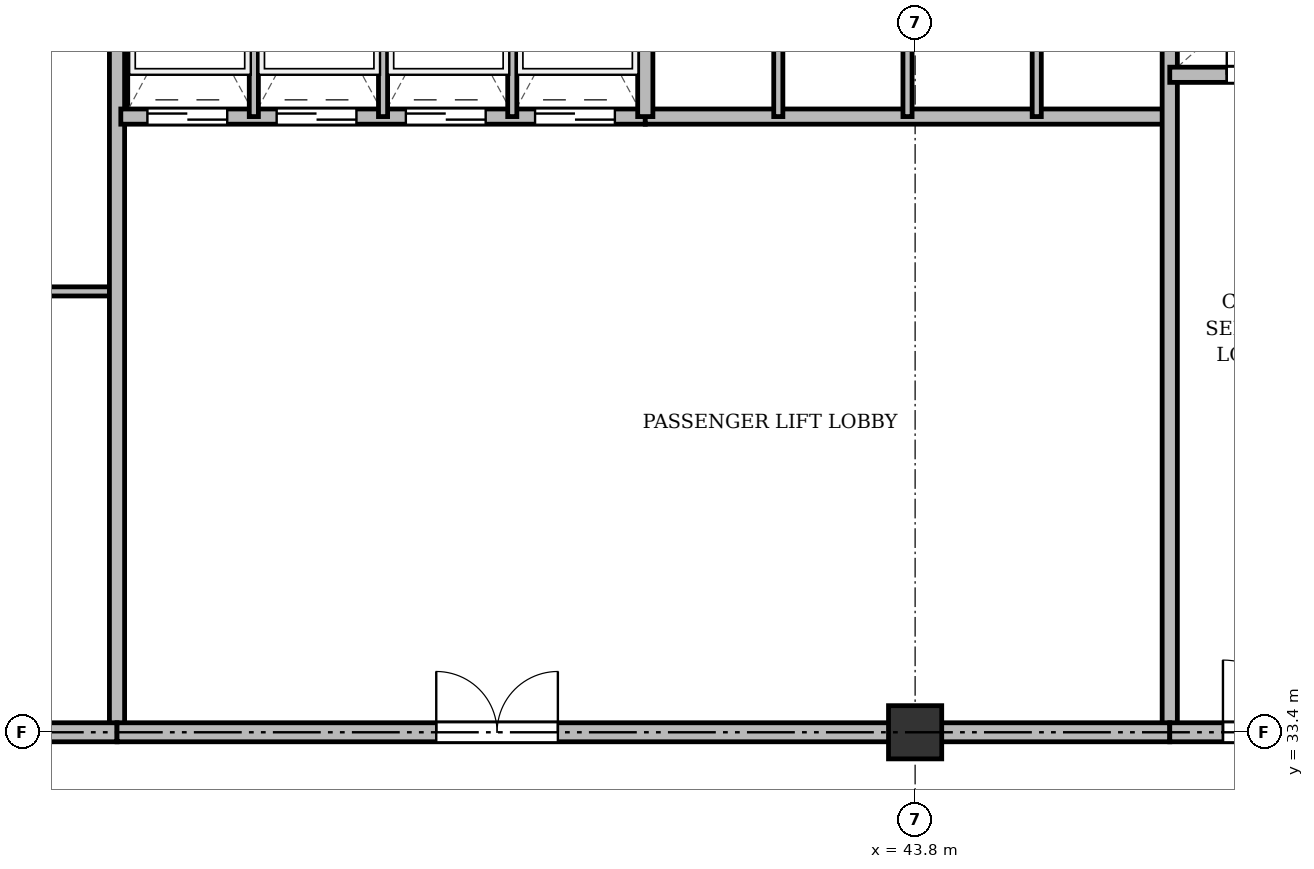
"""IFC4 building model, lengths in metres.
Left out: names, types, materials, properties, quantities, classifications, styles, units other than length and angle.
Written with IfcOpenShell. Run it as: python <this file> out.ifc"""

import sys

from ifc_helpers import new_model, si_unit, direction, frame, frame_2d, origin, origin_2d, place, context, subcontext, project, spatial, rectangle, extrude, source, transform, mapped, element, fill, save


model = new_model("IFC4")
c1 = context("Model", 3, precision=1e-05, world=origin(), true_north=direction((0.0, 1.0)))
c2 = subcontext(c1, "Body", "Model", "MODEL_VIEW")
j1 = project(units=[si_unit("LENGTHUNIT", "METRE"), si_unit("PLANEANGLEUNIT", "RADIAN")], contexts=[c1])
p1 = place(None, origin())
s1 = spatial("IfcSite", under=j1, at=p1, CompositionType="ELEMENT")
p2 = place(p1, origin())
s2 = spatial("IfcBuilding", under=s1, at=p2, CompositionType="ELEMENT")
p3 = place(p2, frame((0.0, 0.0, 194.1)))
s3 = spatial("IfcBuildingStorey", under=s2, at=p3, CompositionType="ELEMENT", Elevation=194.1)
m1 = source(origin(), c2, "Body", "SweptSolid", [
    extrude(rectangle(XDim=0.7, YDim=0.7, at=origin_2d()), origin(), (0.0, 0.0, 1.0), 3.6),
])
p4 = place(p3, frame((43.8, 33.4, 0.0), z_axis=(0.0, 0.0, 1.0), x_axis=(1.0, 0.0, 0.0)))
e1 = element("IfcColumn", 1, at=p4, inside=s3, PredefinedType="COLUMN", context=c2, shape_type="MappedRepresentation", body=[
    mapped(m1, transform((0.0, 0.0, 0.0), x_axis=(1.0, 0.0, 0.0), y_axis=(0.0, 1.0, 0.0), z_axis=(0.0, 0.0, 1.0), scale=1.0)),
])
p5 = place(p3, frame((26.3, 39.2, 0.0), z_axis=(0.0, 0.0, 1.0), x_axis=(1.0, 0.0, 0.0)))
e2 = element("IfcWall", 2, at=p5, inside=s3, PredefinedType="PARTITIONING", context=c2, shape_type="SweptSolid", body=[
    extrude(rectangle(XDim=7.0, YDim=0.12, at=frame_2d((3.5, 0.0))), origin(), (0.0, 0.0, 1.0), 2.86),
])
p6 = place(p5, frame((2.6, 0.0, 0.0)))
e3 = element("IfcOpeningElement", 3, at=p6, cuts=e2, PredefinedType="OPENING", context=c2, shape_type="SweptSolid", body=[
    extrude(rectangle(XDim=0.95, YDim=2.15, at=frame_2d((0.475, 1.075))), frame((0.0, 0.07, 0.0), z_axis=(0.0, -1.0, 0.0), x_axis=(1.0, 0.0, 0.0)), (0.0, 0.0, 1.0), 0.14),
])
p7 = place(p3, frame((33.3, 33.4, 0.0), z_axis=(0.0, 0.0, 1.0), x_axis=(0.0, 1.0, 0.0)))
e4 = element("IfcWall", 4, at=p7, inside=s3, PredefinedType="SOLIDWALL", context=c2, shape_type="SweptSolid", body=[
    extrude(rectangle(XDim=11.3, YDim=0.2, at=frame_2d((5.65, 0.0))), origin(), (0.0, 0.0, 1.0), 2.91),
])
p8 = place(p3, frame((33.35, 41.5, 0.0), z_axis=(0.0, 0.0, 1.0), x_axis=(1.0, 0.0, 0.0)))
e5 = element("IfcWall", 5, at=p8, inside=s3, PredefinedType="SOLIDWALL", context=c2, shape_type="SweptSolid", body=[
    extrude(rectangle(XDim=6.9, YDim=0.2, at=frame_2d((3.45, 0.0))), origin(), (0.0, 0.0, 1.0), 3.36),
])
p9 = place(p8, frame((0.35, 0.0, 0.0)))
e6 = element("IfcOpeningElement", 6, at=p9, cuts=e5, PredefinedType="OPENING", context=c2, shape_type="SweptSolid", body=[
    extrude(rectangle(XDim=1.05, YDim=2.15, at=frame_2d((0.525, 1.075))), frame((0.0, 0.11, 0.0), z_axis=(0.0, -1.0, 0.0), x_axis=(1.0, 0.0, 0.0)), (0.0, 0.0, 1.0), 0.22),
])
p10 = place(p8, frame((2.05, 0.0, 0.0)))
e7 = element("IfcOpeningElement", 7, at=p10, cuts=e5, PredefinedType="OPENING", context=c2, shape_type="SweptSolid", body=[
    extrude(rectangle(XDim=1.05, YDim=2.15, at=frame_2d((0.525, 1.075))), frame((0.0, 0.11, 0.0), z_axis=(0.0, -1.0, 0.0), x_axis=(1.0, 0.0, 0.0)), (0.0, 0.0, 1.0), 0.22),
])
p11 = place(p8, frame((3.75, 0.0, 0.0)))
e8 = element("IfcOpeningElement", 8, at=p11, cuts=e5, PredefinedType="OPENING", context=c2, shape_type="SweptSolid", body=[
    extrude(rectangle(XDim=1.05, YDim=2.15, at=frame_2d((0.525, 1.075))), frame((0.0, 0.11, 0.0), z_axis=(0.0, -1.0, 0.0), x_axis=(1.0, 0.0, 0.0)), (0.0, 0.0, 1.0), 0.22),
])
p12 = place(p8, frame((5.45, 0.0, 0.0)))
e9 = element("IfcOpeningElement", 9, at=p12, cuts=e5, PredefinedType="OPENING", context=c2, shape_type="SweptSolid", body=[
    extrude(rectangle(XDim=1.05, YDim=2.15, at=frame_2d((0.525, 1.075))), frame((0.0, 0.11, 0.0), z_axis=(0.0, -1.0, 0.0), x_axis=(1.0, 0.0, 0.0)), (0.0, 0.0, 1.0), 0.22),
])
for number, where, z_axis, x_axis in (
    (10, (35.1, 41.5, 0.0), (0.0, 0.0, 1.0), (0.0, 1.0, 0.0)),
    (11, (36.8, 41.5, 0.0), (0.0, 0.0, 1.0), (0.0, 1.0, 0.0)),
    (12, (38.5, 41.5, 0.0), (0.0, 0.0, 1.0), (0.0, 1.0, 0.0)),
):
    element("IfcWall", number, at=place(p3, frame(where, z_axis=z_axis, x_axis=x_axis)), inside=s3, PredefinedType="PARTITIONING", context=c2, shape_type="SweptSolid", body=[
        extrude(rectangle(XDim=3.2, YDim=0.12, at=frame_2d((1.6, 0.0))), origin(), (0.0, 0.0, 1.0), 3.36),
    ])
p13 = place(p3, frame((40.25, 41.5, 0.0), z_axis=(0.0, 0.0, 1.0), x_axis=(1.0, 0.0, 0.0)))
e13 = element("IfcWall", 13, at=p13, inside=s3, PredefinedType="SOLIDWALL", context=c2, shape_type="SweptSolid", body=[
    extrude(rectangle(XDim=6.9, YDim=0.2, at=frame_2d((3.45, 0.0))), origin(), (0.0, 0.0, 1.0), 2.86),
])
p14 = place(p3, frame((40.25, 41.5, 0.0), z_axis=(0.0, 0.0, 1.0), x_axis=(0.0, 1.0, 0.0)))
e14 = element("IfcWall", 14, at=p14, inside=s3, PredefinedType="SOLIDWALL", context=c2, shape_type="SweptSolid", body=[
    extrude(rectangle(XDim=3.2, YDim=0.2, at=frame_2d((1.6, 0.0))), origin(), (0.0, 0.0, 1.0), 3.36),
])
p15 = place(p3, frame((42.0, 41.5, 0.0), z_axis=(0.0, 0.0, 1.0), x_axis=(0.0, 1.0, 0.0)))
e15 = element("IfcWall", 15, at=p15, inside=s3, PredefinedType="PARTITIONING", context=c2, shape_type="SweptSolid", body=[
    extrude(rectangle(XDim=3.2, YDim=0.12, at=frame_2d((1.6, 0.0))), origin(), (0.0, 0.0, 1.0), 3.36),
])
p16 = place(p3, frame((43.7, 41.5, 0.0), z_axis=(0.0, 0.0, 1.0), x_axis=(0.0, 1.0, 0.0)))
e16 = element("IfcWall", 16, at=p16, inside=s3, PredefinedType="PARTITIONING", context=c2, shape_type="SweptSolid", body=[
    extrude(rectangle(XDim=3.2, YDim=0.12, at=frame_2d((1.6, 0.0))), origin(), (0.0, 0.0, 1.0), 2.86),
])
p17 = place(p3, frame((45.4, 41.5, 0.0), z_axis=(0.0, 0.0, 1.0), x_axis=(0.0, 1.0, 0.0)))
e17 = element("IfcWall", 17, at=p17, inside=s3, PredefinedType="PARTITIONING", context=c2, shape_type="SweptSolid", body=[
    extrude(rectangle(XDim=3.2, YDim=0.12, at=frame_2d((1.6, 0.0))), origin(), (0.0, 0.0, 1.0), 3.36),
])
p18 = place(p3, frame((47.15, 33.4, 0.0), z_axis=(0.0, 0.0, 1.0), x_axis=(0.0, 1.0, 0.0)))
e18 = element("IfcWall", 18, at=p18, inside=s3, PredefinedType="SOLIDWALL", context=c2, shape_type="SweptSolid", body=[
    extrude(rectangle(XDim=11.3, YDim=0.2, at=frame_2d((5.65, 0.0))), origin(), (0.0, 0.0, 1.0), 2.91),
])
p19 = place(p3, frame((26.3, 33.4, 0.0), z_axis=(0.0, 0.0, 1.0), x_axis=(1.0, 0.0, 0.0)))
e19 = element("IfcWall", 19, at=p19, inside=s3, PredefinedType="PARTITIONING", context=c2, shape_type="SweptSolid", body=[
    extrude(rectangle(XDim=7.0, YDim=0.25, at=frame_2d((3.5, 0.0))), origin(), (0.0, 0.0, 1.0), 2.91),
])
p20 = place(p19, frame((1.35, 0.0, 0.0)))
e20 = element("IfcOpeningElement", 20, at=p20, cuts=e19, PredefinedType="OPENING", context=c2, shape_type="SweptSolid", body=[
    extrude(rectangle(XDim=0.95, YDim=2.15, at=frame_2d((0.475, 1.075))), frame((0.0, 0.135, 0.0), z_axis=(0.0, -1.0, 0.0), x_axis=(1.0, 0.0, 0.0)), (0.0, 0.0, 1.0), 0.27),
])
p21 = place(p3, frame((33.3, 33.4, 0.0), z_axis=(0.0, 0.0, 1.0), x_axis=(1.0, 0.0, 0.0)))
e21 = element("IfcWall", 21, at=p21, inside=s3, PredefinedType="PARTITIONING", context=c2, shape_type="SweptSolid", body=[
    extrude(rectangle(XDim=13.85, YDim=0.25, at=frame_2d((6.925, 0.0))), origin(), (0.0, 0.0, 1.0), 2.91),
])
p22 = place(p21, frame((4.2, 0.0, 0.0)))
e22 = element("IfcOpeningElement", 22, at=p22, cuts=e21, PredefinedType="OPENING", context=c2, shape_type="SweptSolid", body=[
    extrude(rectangle(XDim=1.6, YDim=2.2, at=frame_2d((0.8, 1.1))), frame((0.0, 0.135, 0.0), z_axis=(0.0, -1.0, 0.0), x_axis=(1.0, 0.0, 0.0)), (0.0, 0.0, 1.0), 0.27),
])
p23 = place(p3, frame((47.15, 42.05, 0.0), z_axis=(0.0, 0.0, 1.0), x_axis=(1.0, 0.0, 0.0)))
e23 = element("IfcWall", 23, at=p23, inside=s3, PredefinedType="SOLIDWALL", context=c2, shape_type="SweptSolid", body=[
    extrude(rectangle(XDim=7.85, YDim=0.2, at=frame_2d((3.925, 0.0))), origin(), (0.0, 0.0, 1.0), 2.86),
])
p24 = place(p23, frame((0.75, 0.0, 0.0)))
e24 = element("IfcOpeningElement", 24, at=p24, cuts=e23, PredefinedType="OPENING", context=c2, shape_type="SweptSolid", body=[
    extrude(rectangle(XDim=0.9, YDim=2.1, at=frame_2d((0.45, 1.05))), frame((0.0, 0.11, 0.0), z_axis=(0.0, -1.0, 0.0), x_axis=(1.0, 0.0, 0.0)), (0.0, 0.0, 1.0), 0.22),
])
p25 = place(p23, frame((3.85, 0.0, 0.0)))
e25 = element("IfcOpeningElement", 25, at=p25, cuts=e23, PredefinedType="OPENING", context=c2, shape_type="SweptSolid", body=[
    extrude(rectangle(XDim=0.9, YDim=2.1, at=frame_2d((0.45, 1.05))), frame((0.0, 0.11, 0.0), z_axis=(0.0, -1.0, 0.0), x_axis=(1.0, 0.0, 0.0)), (0.0, 0.0, 1.0), 0.22),
])
p26 = place(p3, frame((47.15, 33.4, 0.0), z_axis=(0.0, 0.0, 1.0), x_axis=(1.0, 0.0, 0.0)))
e26 = element("IfcWall", 26, at=p26, inside=s3, PredefinedType="PARTITIONING", context=c2, shape_type="SweptSolid", body=[
    extrude(rectangle(XDim=11.15, YDim=0.25, at=frame_2d((5.575, 0.0))), origin(), (0.0, 0.0, 1.0), 2.91),
])
p27 = place(p26, frame((0.7, 0.0, 0.0)))
e27 = element("IfcOpeningElement", 27, at=p27, cuts=e26, PredefinedType="OPENING", context=c2, shape_type="SweptSolid", body=[
    extrude(rectangle(XDim=0.95, YDim=2.15, at=frame_2d((0.475, 1.075))), frame((0.0, 0.135, 0.0), z_axis=(0.0, -1.0, 0.0), x_axis=(1.0, 0.0, 0.0)), (0.0, 0.0, 1.0), 0.27),
])
p28 = place(p26, frame((6.0, 0.0, 0.0)))
e28 = element("IfcOpeningElement", 28, at=p28, cuts=e26, PredefinedType="OPENING", context=c2, shape_type="SweptSolid", body=[
    extrude(rectangle(XDim=1.2, YDim=2.15, at=frame_2d((0.6, 1.075))), frame((0.0, 0.135, 0.0), z_axis=(0.0, -1.0, 0.0), x_axis=(1.0, 0.0, 0.0)), (0.0, 0.0, 1.0), 0.27),
])
m2 = source(origin(), c2, "Body", "SweptSolid", [
    extrude(rectangle(XDim=1.05, YDim=2.15, at=frame_2d((0.525, 1.075))), frame((0.0, 0.025, 0.0), z_axis=(0.0, -1.0, 0.0), x_axis=(1.0, 0.0, 0.0)), (0.0, 0.0, 1.0), 0.05),
])
p29 = place(p9, origin())
e29 = element("IfcDoor", 29, at=p29, inside=s3, OperationType="DOUBLE_DOOR_SLIDING", PredefinedType="DOOR", context=c2, shape_type="MappedRepresentation", body=[
    mapped(m2, transform((0.0, 0.0, 0.0), x_axis=(1.0, 0.0, 0.0), y_axis=(0.0, 1.0, 0.0), z_axis=(0.0, 0.0, 1.0), scale=1.0)),
])
fill(e6, e29)
p30 = place(p10, origin())
e30 = element("IfcDoor", 30, at=p30, inside=s3, OperationType="DOUBLE_DOOR_SLIDING", PredefinedType="DOOR", context=c2, shape_type="MappedRepresentation", body=[
    mapped(m2, transform((0.0, 0.0, 0.0), x_axis=(1.0, 0.0, 0.0), y_axis=(0.0, 1.0, 0.0), z_axis=(0.0, 0.0, 1.0), scale=1.0)),
])
fill(e7, e30)
p31 = place(p11, origin())
e31 = element("IfcDoor", 31, at=p31, inside=s3, OperationType="DOUBLE_DOOR_SLIDING", PredefinedType="DOOR", context=c2, shape_type="MappedRepresentation", body=[
    mapped(m2, transform((0.0, 0.0, 0.0), x_axis=(1.0, 0.0, 0.0), y_axis=(0.0, 1.0, 0.0), z_axis=(0.0, 0.0, 1.0), scale=1.0)),
])
fill(e8, e31)
p32 = place(p12, origin())
e32 = element("IfcDoor", 32, at=p32, inside=s3, OperationType="DOUBLE_DOOR_SLIDING", PredefinedType="DOOR", context=c2, shape_type="MappedRepresentation", body=[
    mapped(m2, transform((0.0, 0.0, 0.0), x_axis=(1.0, 0.0, 0.0), y_axis=(0.0, 1.0, 0.0), z_axis=(0.0, 0.0, 1.0), scale=1.0)),
])
fill(e9, e32)
m3 = source(origin(), c2, "Body", "SweptSolid", [
    extrude(rectangle(XDim=1.6, YDim=2.2, at=frame_2d((0.8, 1.1))), frame((0.0, 0.025, 0.0), z_axis=(0.0, -1.0, 0.0), x_axis=(1.0, 0.0, 0.0)), (0.0, 0.0, 1.0), 0.05),
])
p33 = place(p22, origin())
e33 = element("IfcDoor", 33, at=p33, inside=s3, OperationType="DOUBLE_DOOR_SINGLE_SWING", PredefinedType="DOOR", context=c2, shape_type="MappedRepresentation", body=[
    mapped(m3, transform((0.0, 0.0, 0.0), x_axis=(1.0, 0.0, 0.0), y_axis=(0.0, 1.0, 0.0), z_axis=(0.0, 0.0, 1.0), scale=1.0)),
])
fill(e22, e33)
m4 = source(origin(), c2, "Body", "SweptSolid", [
    extrude(rectangle(XDim=0.9, YDim=2.1, at=frame_2d((0.45, 1.05))), frame((0.0, 0.025, 0.0), z_axis=(0.0, -1.0, 0.0), x_axis=(1.0, 0.0, 0.0)), (0.0, 0.0, 1.0), 0.05),
])
p34 = place(p24, origin())
e34 = element("IfcDoor", 34, at=p34, inside=s3, OperationType="SINGLE_SWING_LEFT", PredefinedType="DOOR", context=c2, shape_type="MappedRepresentation", body=[
    mapped(m4, transform((0.0, 0.0, 0.0), x_axis=(1.0, 0.0, 0.0), y_axis=(0.0, 1.0, 0.0), z_axis=(0.0, 0.0, 1.0), scale=1.0)),
])
fill(e24, e34)
m5 = source(origin(), c2, "Body", "SweptSolid", [
    extrude(rectangle(XDim=0.95, YDim=2.15, at=frame_2d((0.475, 1.075))), frame((0.0, 0.025, 0.0), z_axis=(0.0, -1.0, 0.0), x_axis=(1.0, 0.0, 0.0)), (0.0, 0.0, 1.0), 0.05),
])
p35 = place(p27, origin())
e35 = element("IfcDoor", 35, at=p35, inside=s3, OperationType="SINGLE_SWING_LEFT", PredefinedType="DOOR", context=c2, shape_type="MappedRepresentation", body=[
    mapped(m5, transform((0.0, 0.0, 0.0), x_axis=(1.0, 0.0, 0.0), y_axis=(0.0, 1.0, 0.0), z_axis=(0.0, 0.0, 1.0), scale=1.0)),
])
fill(e27, e35)
save(model, sys.argv[1])
